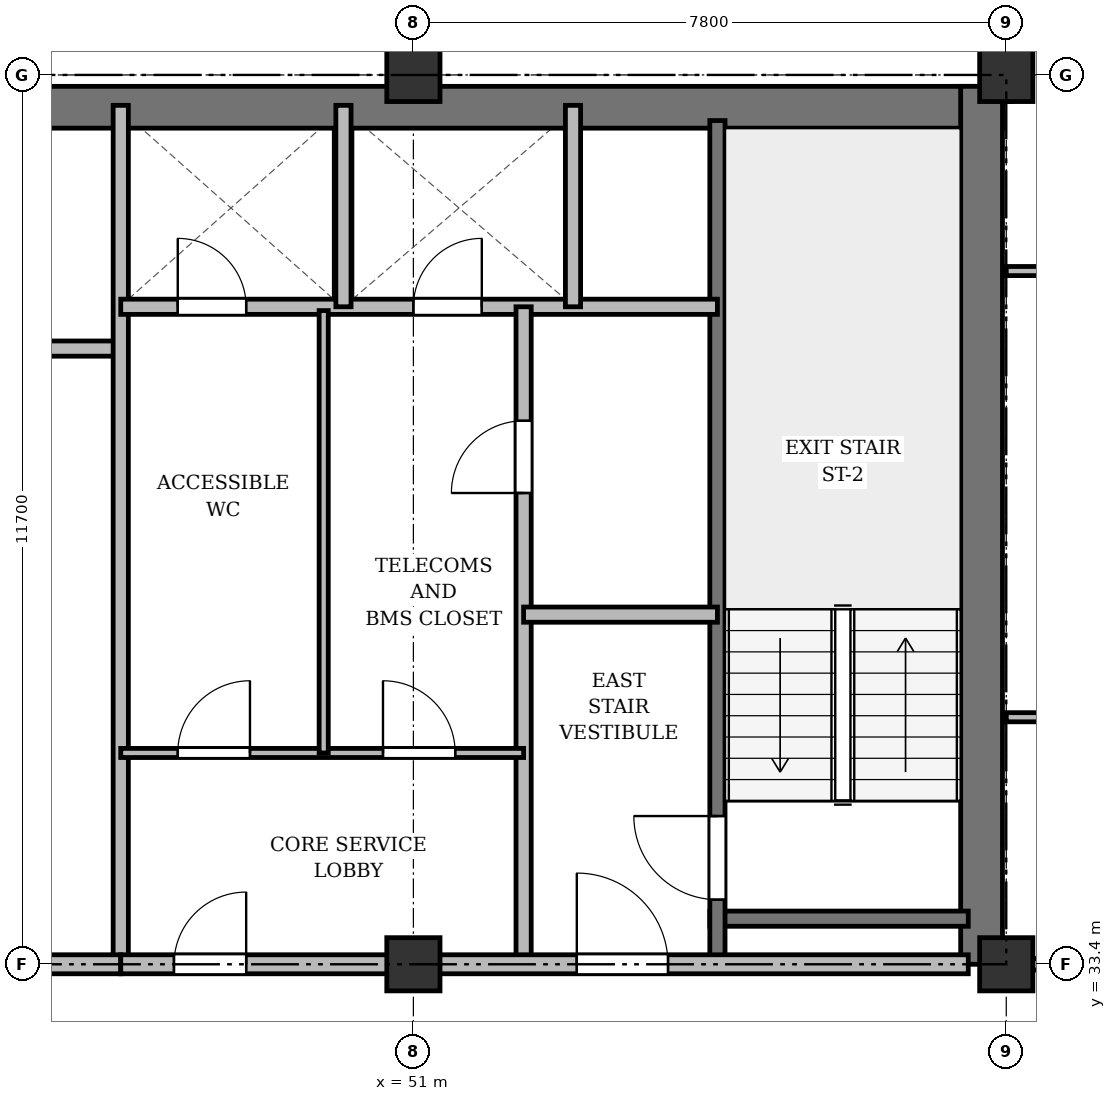
"""IFC4 building model, lengths in metres.
Left out: names, types, materials, properties, quantities, classifications, styles, units other than length and angle.
Written with IfcOpenShell. Run it as: python <this file> out.ifc"""

import sys

from ifc_helpers import new_model, si_unit, direction, frame, frame_2d, origin, origin_2d, place, context, subcontext, project, spatial, rectangle, extrude, source, transform, mapped, element, fill, save


model = new_model("IFC4")
c1 = context("Model", 3, precision=1e-05, world=origin(), true_north=direction((0.0, 1.0)))
c2 = subcontext(c1, "Body", "Model", "MODEL_VIEW")
j1 = project(units=[si_unit("LENGTHUNIT", "METRE"), si_unit("PLANEANGLEUNIT", "RADIAN")], contexts=[c1])
p1 = place(None, origin())
s1 = spatial("IfcSite", under=j1, at=p1, CompositionType="ELEMENT")
p2 = place(p1, origin())
s2 = spatial("IfcBuilding", under=s1, at=p2, CompositionType="ELEMENT")
p3 = place(p2, frame((0.0, 0.0, 208.5)))
s3 = spatial("IfcBuildingStorey", under=s2, at=p3, CompositionType="ELEMENT", Elevation=208.5)
m1 = source(origin(), c2, "Body", "SweptSolid", [
    extrude(rectangle(XDim=0.7, YDim=0.7, at=origin_2d()), origin(), (0.0, 0.0, 1.0), 3.6),
])
for number, where, z_axis, x_axis in (
    (1, (51.0, 33.4, 0.0), (0.0, 0.0, 1.0), (1.0, 0.0, 0.0)),
    (2, (51.0, 45.1, 0.0), (0.0, 0.0, 1.0), (1.0, 0.0, 0.0)),
    (3, (58.8, 33.4, 0.0), (0.0, 0.0, 1.0), (1.0, 0.0, 0.0)),
    (4, (58.8, 45.1, 0.0), (0.0, 0.0, 1.0), (1.0, 0.0, 0.0)),
):
    element("IfcColumn", number, at=place(p3, frame(where, z_axis=z_axis, x_axis=x_axis)), inside=s3, PredefinedType="COLUMN", context=c2, shape_type="MappedRepresentation", body=[
        mapped(m1, transform((0.0, 0.0, 0.0), x_axis=(1.0, 0.0, 0.0), y_axis=(0.0, 1.0, 0.0), z_axis=(0.0, 0.0, 1.0), scale=1.0)),
    ])
p4 = place(p3, frame((15.65, 44.675, 0.0), z_axis=(0.0, 0.0, 1.0), x_axis=(1.0, 0.0, 0.0)))
e5 = element("IfcWall", 5, at=p4, inside=s3, PredefinedType="SHEAR", context=c2, shape_type="SweptSolid", body=[
    extrude(rectangle(XDim=43.1, YDim=0.55, at=frame_2d((21.55, 0.0))), origin(), (0.0, 0.0, 1.0), 3.36),
])
p5 = place(p3, frame((58.475, 33.4, 0.0), z_axis=(0.0, 0.0, 1.0), x_axis=(0.0, 1.0, 0.0)))
e6 = element("IfcWall", 6, at=p5, inside=s3, PredefinedType="SHEAR", context=c2, shape_type="SweptSolid", body=[
    extrude(rectangle(XDim=11.55, YDim=0.55, at=frame_2d((5.775, 0.0))), origin(), (0.0, 0.0, 1.0), 3.36),
])
p6 = place(p3, frame((54.9, 34.0, 0.0), z_axis=(0.0, 0.0, 1.0), x_axis=(1.0, 0.0, 0.0)))
e7 = element("IfcWall", 7, at=p6, inside=s3, PredefinedType="SHEAR", context=c2, shape_type="SweptSolid", body=[
    extrude(rectangle(XDim=3.4, YDim=0.2, at=frame_2d((1.7, 0.0))), origin(), (0.0, 0.0, 1.0), 3.36),
])
p7 = place(p3, frame((55.0, 33.4, 0.0), z_axis=(0.0, 0.0, 1.0), x_axis=(0.0, 1.0, 0.0)))
e8 = element("IfcWall", 8, at=p7, inside=s3, PredefinedType="SHEAR", context=c2, shape_type="SweptSolid", body=[
    extrude(rectangle(XDim=11.1, YDim=0.2, at=frame_2d((5.55, 0.0))), origin(), (0.0, 0.0, 1.0), 3.36),
])
p8 = place(p7, frame((0.85, 0.0, 0.0)))
e9 = element("IfcOpeningElement", 9, at=p8, cuts=e8, PredefinedType="OPENING", context=c2, shape_type="SweptSolid", body=[
    extrude(rectangle(XDim=1.1, YDim=2.15, at=frame_2d((0.55, 1.075))), frame((0.0, 0.11, 0.0), z_axis=(0.0, -1.0, 0.0), x_axis=(1.0, 0.0, 0.0)), (0.0, 0.0, 1.0), 0.22),
])
p9 = place(p3, frame((40.25, 41.5, 0.0), z_axis=(0.0, 0.0, 1.0), x_axis=(1.0, 0.0, 0.0)))
e10 = element("IfcWall", 10, at=p9, inside=s3, PredefinedType="SOLIDWALL", context=c2, shape_type="SweptSolid", body=[
    extrude(rectangle(XDim=6.9, YDim=0.2, at=frame_2d((3.45, 0.0))), origin(), (0.0, 0.0, 1.0), 2.86),
])
p10 = place(p3, frame((47.15, 33.4, 0.0), z_axis=(0.0, 0.0, 1.0), x_axis=(0.0, 1.0, 0.0)))
e11 = element("IfcWall", 11, at=p10, inside=s3, PredefinedType="SOLIDWALL", context=c2, shape_type="SweptSolid", body=[
    extrude(rectangle(XDim=11.3, YDim=0.2, at=frame_2d((5.65, 0.0))), origin(), (0.0, 0.0, 1.0), 2.91),
])
p11 = place(p3, frame((33.3, 33.4, 0.0), z_axis=(0.0, 0.0, 1.0), x_axis=(1.0, 0.0, 0.0)))
e12 = element("IfcWall", 12, at=p11, inside=s3, PredefinedType="PARTITIONING", context=c2, shape_type="SweptSolid", body=[
    extrude(rectangle(XDim=13.85, YDim=0.25, at=frame_2d((6.925, 0.0))), origin(), (0.0, 0.0, 1.0), 2.91),
])
p12 = place(p11, frame((4.2, 0.0, 0.0)))
e13 = element("IfcOpeningElement", 13, at=p12, cuts=e12, PredefinedType="OPENING", context=c2, shape_type="SweptSolid", body=[
    extrude(rectangle(XDim=1.6, YDim=2.2, at=frame_2d((0.8, 1.1))), frame((0.0, 0.135, 0.0), z_axis=(0.0, -1.0, 0.0), x_axis=(1.0, 0.0, 0.0)), (0.0, 0.0, 1.0), 0.27),
])
p13 = place(p3, frame((47.15, 42.05, 0.0), z_axis=(0.0, 0.0, 1.0), x_axis=(1.0, 0.0, 0.0)))
e14 = element("IfcWall", 14, at=p13, inside=s3, PredefinedType="SOLIDWALL", context=c2, shape_type="SweptSolid", body=[
    extrude(rectangle(XDim=7.85, YDim=0.2, at=frame_2d((3.925, 0.0))), origin(), (0.0, 0.0, 1.0), 2.86),
])
p14 = place(p13, frame((0.75, 0.0, 0.0)))
e15 = element("IfcOpeningElement", 15, at=p14, cuts=e14, PredefinedType="OPENING", context=c2, shape_type="SweptSolid", body=[
    extrude(rectangle(XDim=0.9, YDim=2.1, at=frame_2d((0.45, 1.05))), frame((0.0, 0.11, 0.0), z_axis=(0.0, -1.0, 0.0), x_axis=(1.0, 0.0, 0.0)), (0.0, 0.0, 1.0), 0.22),
])
p15 = place(p13, frame((3.85, 0.0, 0.0)))
e16 = element("IfcOpeningElement", 16, at=p15, cuts=e14, PredefinedType="OPENING", context=c2, shape_type="SweptSolid", body=[
    extrude(rectangle(XDim=0.9, YDim=2.1, at=frame_2d((0.45, 1.05))), frame((0.0, 0.11, 0.0), z_axis=(0.0, -1.0, 0.0), x_axis=(1.0, 0.0, 0.0)), (0.0, 0.0, 1.0), 0.22),
])
for number, where, z_axis, x_axis in (
    (17, (50.08, 42.05, 0.0), (0.0, 0.0, 1.0), (0.0, 1.0, 0.0)),
    (18, (53.1, 42.05, 0.0), (0.0, 0.0, 1.0), (0.0, 1.0, 0.0)),
):
    element("IfcWall", number, at=place(p3, frame(where, z_axis=z_axis, x_axis=x_axis)), inside=s3, PredefinedType="SOLIDWALL", context=c2, shape_type="SweptSolid", body=[
        extrude(rectangle(XDim=2.65, YDim=0.2, at=frame_2d((1.325, 0.0))), origin(), (0.0, 0.0, 1.0), 3.36),
    ])
p16 = place(p3, frame((52.45, 33.4, 0.0), z_axis=(0.0, 0.0, 1.0), x_axis=(0.0, 1.0, 0.0)))
e19 = element("IfcWall", 19, at=p16, inside=s3, PredefinedType="PARTITIONING", context=c2, shape_type="SweptSolid", body=[
    extrude(rectangle(XDim=8.65, YDim=0.2, at=frame_2d((4.325, 0.0))), origin(), (0.0, 0.0, 1.0), 2.91),
])
p17 = place(p16, frame((6.2, 0.0, 0.0)))
e20 = element("IfcOpeningElement", 20, at=p17, cuts=e19, PredefinedType="OPENING", context=c2, shape_type="SweptSolid", body=[
    extrude(rectangle(XDim=0.95, YDim=2.15, at=frame_2d((0.475, 1.075))), frame((0.0, 0.11, 0.0), z_axis=(0.0, -1.0, 0.0), x_axis=(1.0, 0.0, 0.0)), (0.0, 0.0, 1.0), 0.22),
])
p18 = place(p3, frame((52.45, 38.0, 0.0), z_axis=(0.0, 0.0, 1.0), x_axis=(1.0, 0.0, 0.0)))
e21 = element("IfcWall", 21, at=p18, inside=s3, PredefinedType="PARTITIONING", context=c2, shape_type="SweptSolid", body=[
    extrude(rectangle(XDim=2.55, YDim=0.2, at=frame_2d((1.275, 0.0))), origin(), (0.0, 0.0, 1.0), 3.36),
])
p19 = place(p3, frame((47.15, 36.18, 0.0), z_axis=(0.0, 0.0, 1.0), x_axis=(1.0, 0.0, 0.0)))
e22 = element("IfcWall", 22, at=p19, inside=s3, PredefinedType="PARTITIONING", context=c2, shape_type="SweptSolid", body=[
    extrude(rectangle(XDim=5.3, YDim=0.12, at=frame_2d((2.65, 0.0))), origin(), (0.0, 0.0, 1.0), 2.86),
])
p20 = place(p19, frame((0.75, 0.0, 0.0)))
e23 = element("IfcOpeningElement", 23, at=p20, cuts=e22, PredefinedType="OPENING", context=c2, shape_type="SweptSolid", body=[
    extrude(rectangle(XDim=0.95, YDim=2.15, at=frame_2d((0.475, 1.075))), frame((0.0, 0.07, 0.0), z_axis=(0.0, -1.0, 0.0), x_axis=(1.0, 0.0, 0.0)), (0.0, 0.0, 1.0), 0.14),
])
p21 = place(p19, frame((3.45, 0.0, 0.0)))
e24 = element("IfcOpeningElement", 24, at=p21, cuts=e22, PredefinedType="OPENING", context=c2, shape_type="SweptSolid", body=[
    extrude(rectangle(XDim=0.95, YDim=2.15, at=frame_2d((0.475, 1.075))), frame((0.0, 0.07, 0.0), z_axis=(0.0, -1.0, 0.0), x_axis=(1.0, 0.0, 0.0)), (0.0, 0.0, 1.0), 0.14),
])
p22 = place(p3, frame((49.82, 36.18, 0.0), z_axis=(0.0, 0.0, 1.0), x_axis=(0.0, 1.0, 0.0)))
e25 = element("IfcWall", 25, at=p22, inside=s3, PredefinedType="PARTITIONING", context=c2, shape_type="SweptSolid", body=[
    extrude(rectangle(XDim=5.82, YDim=0.12, at=frame_2d((2.91, 0.0))), origin(), (0.0, 0.0, 1.0), 3.36),
])
p23 = place(p3, frame((47.15, 33.4, 0.0), z_axis=(0.0, 0.0, 1.0), x_axis=(1.0, 0.0, 0.0)))
e26 = element("IfcWall", 26, at=p23, inside=s3, PredefinedType="PARTITIONING", context=c2, shape_type="SweptSolid", body=[
    extrude(rectangle(XDim=11.15, YDim=0.25, at=frame_2d((5.575, 0.0))), origin(), (0.0, 0.0, 1.0), 2.91),
])
p24 = place(p23, frame((0.7, 0.0, 0.0)))
e27 = element("IfcOpeningElement", 27, at=p24, cuts=e26, PredefinedType="OPENING", context=c2, shape_type="SweptSolid", body=[
    extrude(rectangle(XDim=0.95, YDim=2.15, at=frame_2d((0.475, 1.075))), frame((0.0, 0.135, 0.0), z_axis=(0.0, -1.0, 0.0), x_axis=(1.0, 0.0, 0.0)), (0.0, 0.0, 1.0), 0.27),
])
p25 = place(p23, frame((6.0, 0.0, 0.0)))
e28 = element("IfcOpeningElement", 28, at=p25, cuts=e26, PredefinedType="OPENING", context=c2, shape_type="SweptSolid", body=[
    extrude(rectangle(XDim=1.2, YDim=2.15, at=frame_2d((0.6, 1.075))), frame((0.0, 0.135, 0.0), z_axis=(0.0, -1.0, 0.0), x_axis=(1.0, 0.0, 0.0)), (0.0, 0.0, 1.0), 0.27),
])
p26 = place(p3, frame((58.8, 36.65, 0.0), z_axis=(0.0, 0.0, 1.0), x_axis=(1.0, 0.0, 0.0)))
e29 = element("IfcWall", 29, at=p26, inside=s3, PredefinedType="PARTITIONING", context=c2, shape_type="SweptSolid", body=[
    extrude(rectangle(XDim=2.45, YDim=0.12, at=frame_2d((1.225, 0.0))), origin(), (0.0, 0.0, 1.0), 2.86),
])
p27 = place(p3, frame((58.8, 42.52, 0.0), z_axis=(0.0, 0.0, 1.0), x_axis=(1.0, 0.0, 0.0)))
e30 = element("IfcWall", 30, at=p27, inside=s3, PredefinedType="PARTITIONING", context=c2, shape_type="SweptSolid", body=[
    extrude(rectangle(XDim=3.675, YDim=0.12, at=frame_2d((1.837, 0.0))), origin(), (0.0, 0.0, 1.0), 2.86),
])
p28 = place(p27, frame((1.559, 0.0, 0.0)))
e31 = element("IfcOpeningElement", 31, at=p28, cuts=e30, PredefinedType="OPENING", context=c2, shape_type="SweptSolid", body=[
    extrude(rectangle(XDim=0.95, YDim=2.15, at=frame_2d((0.475, 1.075))), frame((0.0, 0.07, 0.0), z_axis=(0.0, -1.0, 0.0), x_axis=(1.0, 0.0, 0.0)), (0.0, 0.0, 1.0), 0.14),
])
p29 = place(p3, frame((58.8, 33.4, 0.0), z_axis=(0.0, 0.0, 1.0), x_axis=(1.0, 0.0, 0.0)))
e32 = element("IfcWall", 32, at=p29, inside=s3, PredefinedType="PARTITIONING", context=c2, shape_type="SweptSolid", body=[
    extrude(rectangle(XDim=7.35, YDim=0.15, at=frame_2d((3.675, 0.0))), origin(), (0.0, 0.0, 1.0), 2.91),
])
p30 = place(p29, frame((4.275, 0.0, 0.0)))
e33 = element("IfcOpeningElement", 33, at=p30, cuts=e32, PredefinedType="OPENING", context=c2, shape_type="SweptSolid", body=[
    extrude(rectangle(XDim=0.95, YDim=2.15, at=frame_2d((0.475, 1.075))), frame((0.0, 0.085, 0.0), z_axis=(0.0, -1.0, 0.0), x_axis=(1.0, 0.0, 0.0)), (0.0, 0.0, 1.0), 0.17),
])
p31 = place(p3, frame((58.8, 44.75, 0.0), z_axis=(0.0, 0.0, 1.0), x_axis=(0.0, 1.0, 0.0)))
e34 = element("IfcWall", 34, at=p31, inside=s3, PredefinedType="PARTITIONING", context=c2, shape_type="SweptSolid", body=[
    extrude(rectangle(XDim=3.61, YDim=0.15, at=frame_2d((1.805, 0.0))), origin(), (0.0, 0.0, 1.0), 2.86),
])
p32 = place(p31, frame((1.1, 0.0, 0.0)))
e35 = element("IfcOpeningElement", 35, at=p32, cuts=e34, PredefinedType="OPENING", context=c2, shape_type="SweptSolid", body=[
    extrude(rectangle(XDim=0.95, YDim=2.15, at=frame_2d((0.475, 1.075))), frame((0.0, 0.085, 0.0), z_axis=(0.0, -1.0, 0.0), x_axis=(1.0, 0.0, 0.0)), (0.0, 0.0, 1.0), 0.17),
])
m2 = source(origin(), c2, "Body", "SweptSolid", [
    extrude(rectangle(XDim=1.1, YDim=2.15, at=frame_2d((0.55, 1.075))), frame((0.0, 0.025, 0.0), z_axis=(0.0, -1.0, 0.0), x_axis=(1.0, 0.0, 0.0)), (0.0, 0.0, 1.0), 0.05),
])
p33 = place(p8, origin())
e36 = element("IfcDoor", 36, at=p33, inside=s3, OperationType="SINGLE_SWING_RIGHT", PredefinedType="DOOR", context=c2, shape_type="MappedRepresentation", body=[
    mapped(m2, transform((0.0, 0.0, 0.0), x_axis=(1.0, 0.0, 0.0), y_axis=(0.0, 1.0, 0.0), z_axis=(0.0, 0.0, 1.0), scale=1.0)),
])
fill(e9, e36)
m3 = source(origin(), c2, "Body", "SweptSolid", [
    extrude(rectangle(XDim=0.9, YDim=2.1, at=frame_2d((0.45, 1.05))), frame((0.0, 0.025, 0.0), z_axis=(0.0, -1.0, 0.0), x_axis=(1.0, 0.0, 0.0)), (0.0, 0.0, 1.0), 0.05),
])
p34 = place(p14, origin())
e37 = element("IfcDoor", 37, at=p34, inside=s3, OperationType="SINGLE_SWING_LEFT", PredefinedType="DOOR", context=c2, shape_type="MappedRepresentation", body=[
    mapped(m3, transform((0.0, 0.0, 0.0), x_axis=(1.0, 0.0, 0.0), y_axis=(0.0, 1.0, 0.0), z_axis=(0.0, 0.0, 1.0), scale=1.0)),
])
fill(e15, e37)
p35 = place(p15, origin())
e38 = element("IfcDoor", 38, at=p35, inside=s3, OperationType="SINGLE_SWING_RIGHT", PredefinedType="DOOR", context=c2, shape_type="MappedRepresentation", body=[
    mapped(m3, transform((0.0, 0.0, 0.0), x_axis=(1.0, 0.0, 0.0), y_axis=(0.0, 1.0, 0.0), z_axis=(0.0, 0.0, 1.0), scale=1.0)),
])
fill(e16, e38)
m4 = source(origin(), c2, "Body", "SweptSolid", [
    extrude(rectangle(XDim=0.95, YDim=2.15, at=frame_2d((0.475, 1.075))), frame((0.0, 0.025, 0.0), z_axis=(0.0, -1.0, 0.0), x_axis=(1.0, 0.0, 0.0)), (0.0, 0.0, 1.0), 0.05),
])
p36 = place(p17, origin())
e39 = element("IfcDoor", 39, at=p36, inside=s3, OperationType="SINGLE_SWING_LEFT", PredefinedType="DOOR", context=c2, shape_type="MappedRepresentation", body=[
    mapped(m4, transform((0.0, 0.0, 0.0), x_axis=(1.0, 0.0, 0.0), y_axis=(0.0, 1.0, 0.0), z_axis=(0.0, 0.0, 1.0), scale=1.0)),
])
fill(e20, e39)
p37 = place(p20, origin())
e40 = element("IfcDoor", 40, at=p37, inside=s3, OperationType="SINGLE_SWING_RIGHT", PredefinedType="DOOR", context=c2, shape_type="MappedRepresentation", body=[
    mapped(m4, transform((0.0, 0.0, 0.0), x_axis=(1.0, 0.0, 0.0), y_axis=(0.0, 1.0, 0.0), z_axis=(0.0, 0.0, 1.0), scale=1.0)),
])
fill(e23, e40)
p38 = place(p21, origin())
e41 = element("IfcDoor", 41, at=p38, inside=s3, OperationType="SINGLE_SWING_LEFT", PredefinedType="DOOR", context=c2, shape_type="MappedRepresentation", body=[
    mapped(m4, transform((0.0, 0.0, 0.0), x_axis=(1.0, 0.0, 0.0), y_axis=(0.0, 1.0, 0.0), z_axis=(0.0, 0.0, 1.0), scale=1.0)),
])
fill(e24, e41)
p39 = place(p24, origin())
e42 = element("IfcDoor", 42, at=p39, inside=s3, OperationType="SINGLE_SWING_RIGHT", PredefinedType="DOOR", context=c2, shape_type="MappedRepresentation", body=[
    mapped(m4, transform((0.0, 0.0, 0.0), x_axis=(1.0, 0.0, 0.0), y_axis=(0.0, 1.0, 0.0), z_axis=(0.0, 0.0, 1.0), scale=1.0)),
])
fill(e27, e42)
m5 = source(origin(), c2, "Body", "SweptSolid", [
    extrude(rectangle(XDim=1.2, YDim=2.15, at=frame_2d((0.6, 1.075))), frame((0.0, 0.025, 0.0), z_axis=(0.0, -1.0, 0.0), x_axis=(1.0, 0.0, 0.0)), (0.0, 0.0, 1.0), 0.05),
])
p40 = place(p25, origin())
e43 = element("IfcDoor", 43, at=p40, inside=s3, OperationType="SINGLE_SWING_LEFT", PredefinedType="DOOR", context=c2, shape_type="MappedRepresentation", body=[
    mapped(m5, transform((0.0, 0.0, 0.0), x_axis=(1.0, 0.0, 0.0), y_axis=(0.0, 1.0, 0.0), z_axis=(0.0, 0.0, 1.0), scale=1.0)),
])
fill(e28, e43)
save(model, sys.argv[1])
